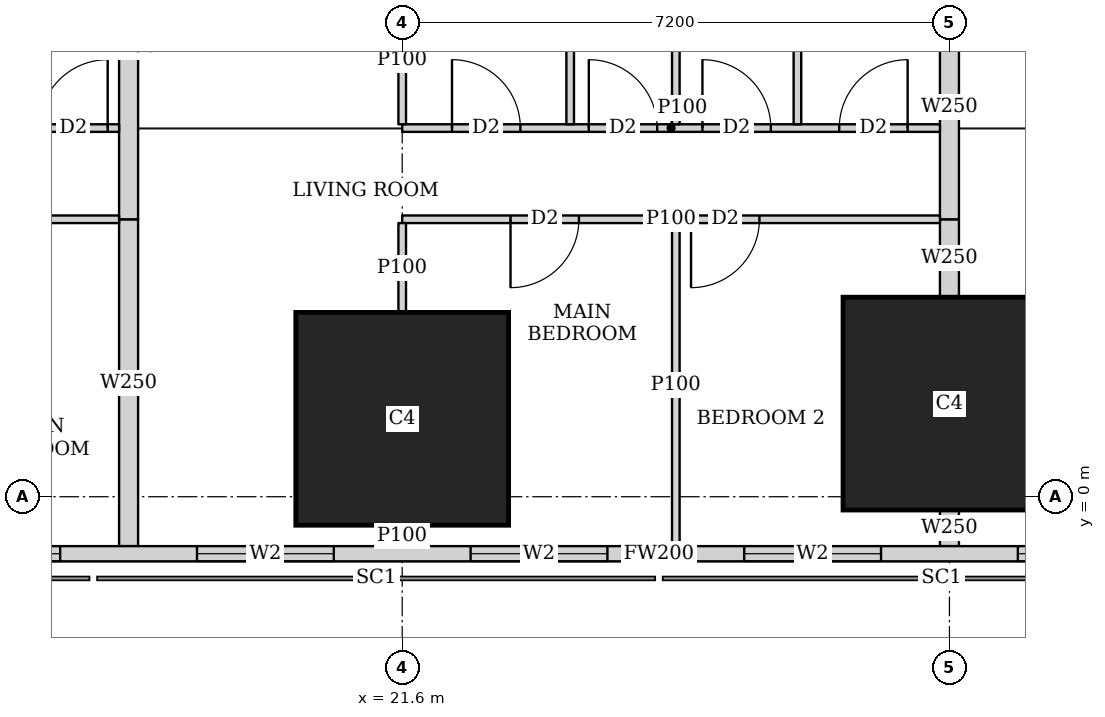
"""IFC4 building model, lengths in metres.
Left out: names, types, materials, properties, quantities, classifications, styles, units other than length and angle.
Written with IfcOpenShell. Run it as: python <this file> out.ifc"""

import sys

from ifc_helpers import new_model, si_unit, direction, frame, frame_2d, origin, origin_2d, place, context, subcontext, project, spatial, rectangle, extrude, element, fill, save


model = new_model("IFC4")
c1 = context("Model", 3, precision=1e-05, world=origin(), true_north=direction((0.0, 1.0)))
c2 = subcontext(c1, "Body", "Model", "MODEL_VIEW")
j1 = project(units=[si_unit("LENGTHUNIT", "METRE"), si_unit("PLANEANGLEUNIT", "RADIAN")], contexts=[c1])
p1 = place(None, origin())
s1 = spatial("IfcSite", under=j1, at=p1, CompositionType="ELEMENT")
p2 = place(p1, origin())
s2 = spatial("IfcBuilding", under=s1, at=p2, CompositionType="ELEMENT")
p3 = place(p2, frame((0.0, 0.0, 53.75)))
s3 = spatial("IfcBuildingStorey", under=s2, at=p3, CompositionType="ELEMENT", Elevation=53.75)
for number, where, z_axis, x_axis in (
    (1, (21.6, 1.025, 0.0), (0.0, 0.0, 1.0), (1.0, 0.0, 0.0)),
    (2, (28.8, 1.225, 0.0), (0.0, 0.0, 1.0), (1.0, 0.0, 0.0)),
):
    element("IfcColumn", number, at=place(p3, frame(where, z_axis=z_axis, x_axis=x_axis)), inside=s3, PredefinedType="COLUMN", context=c2, shape_type="SweptSolid", body=[
        extrude(rectangle(XDim=2.8, YDim=2.8, at=origin_2d()), origin(), (0.0, 0.0, 1.0), 3.75),
    ])
p4 = place(p3, frame((2.163, -0.75, 0.0), z_axis=(0.0, 0.0, 1.0), x_axis=(1.0, 0.0, 0.0)))
e3 = element("IfcWall", 3, at=p4, inside=s3, PredefinedType="SOLIDWALL", context=c2, shape_type="SweptSolid", body=[
    extrude(rectangle(XDim=45.628, YDim=0.2, at=frame_2d((22.814, 0.0))), origin(), (0.0, 0.0, 1.0), 3.5),
])
p5 = place(p4, frame((9.537, 0.0, 0.9)))
e4 = element("IfcOpeningElement", 4, at=p5, cuts=e3, PredefinedType="OPENING", context=c2, shape_type="SweptSolid", body=[
    extrude(rectangle(XDim=1.8, YDim=1.5, at=frame_2d((0.9, 0.75))), frame((0.0, 0.11, 0.0), z_axis=(0.0, -1.0, 0.0), x_axis=(1.0, 0.0, 0.0)), (0.0, 0.0, 1.0), 0.22),
])
p6 = place(p4, frame((13.137, 0.0, 0.9)))
e5 = element("IfcOpeningElement", 5, at=p6, cuts=e3, PredefinedType="OPENING", context=c2, shape_type="SweptSolid", body=[
    extrude(rectangle(XDim=1.8, YDim=1.5, at=frame_2d((0.9, 0.75))), frame((0.0, 0.11, 0.0), z_axis=(0.0, -1.0, 0.0), x_axis=(1.0, 0.0, 0.0)), (0.0, 0.0, 1.0), 0.22),
])
p7 = place(p4, frame((16.737, 0.0, 0.9)))
e6 = element("IfcOpeningElement", 6, at=p7, cuts=e3, PredefinedType="OPENING", context=c2, shape_type="SweptSolid", body=[
    extrude(rectangle(XDim=1.8, YDim=1.5, at=frame_2d((0.9, 0.75))), frame((0.0, 0.11, 0.0), z_axis=(0.0, -1.0, 0.0), x_axis=(1.0, 0.0, 0.0)), (0.0, 0.0, 1.0), 0.22),
])
p8 = place(p4, frame((20.337, 0.0, 0.9)))
e7 = element("IfcOpeningElement", 7, at=p8, cuts=e3, PredefinedType="OPENING", context=c2, shape_type="SweptSolid", body=[
    extrude(rectangle(XDim=1.8, YDim=1.5, at=frame_2d((0.9, 0.75))), frame((0.0, 0.11, 0.0), z_axis=(0.0, -1.0, 0.0), x_axis=(1.0, 0.0, 0.0)), (0.0, 0.0, 1.0), 0.22),
])
p9 = place(p4, frame((23.937, 0.0, 0.9)))
e8 = element("IfcOpeningElement", 8, at=p9, cuts=e3, PredefinedType="OPENING", context=c2, shape_type="SweptSolid", body=[
    extrude(rectangle(XDim=1.8, YDim=1.5, at=frame_2d((0.9, 0.75))), frame((0.0, 0.11, 0.0), z_axis=(0.0, -1.0, 0.0), x_axis=(1.0, 0.0, 0.0)), (0.0, 0.0, 1.0), 0.22),
])
p10 = place(p4, frame((27.537, 0.0, 0.9)))
e9 = element("IfcOpeningElement", 9, at=p10, cuts=e3, PredefinedType="OPENING", context=c2, shape_type="SweptSolid", body=[
    extrude(rectangle(XDim=1.8, YDim=1.5, at=frame_2d((0.9, 0.75))), frame((0.0, 0.11, 0.0), z_axis=(0.0, -1.0, 0.0), x_axis=(1.0, 0.0, 0.0)), (0.0, 0.0, 1.0), 0.22),
])
p11 = place(p4, frame((31.137, 0.0, 0.9)))
e10 = element("IfcOpeningElement", 10, at=p11, cuts=e3, PredefinedType="OPENING", context=c2, shape_type="SweptSolid", body=[
    extrude(rectangle(XDim=1.8, YDim=1.5, at=frame_2d((0.9, 0.75))), frame((0.0, 0.11, 0.0), z_axis=(0.0, -1.0, 0.0), x_axis=(1.0, 0.0, 0.0)), (0.0, 0.0, 1.0), 0.22),
])
p12 = place(p4, frame((34.737, 0.0, 0.9)))
e11 = element("IfcOpeningElement", 11, at=p12, cuts=e3, PredefinedType="OPENING", context=c2, shape_type="SweptSolid", body=[
    extrude(rectangle(XDim=1.8, YDim=1.5, at=frame_2d((0.9, 0.75))), frame((0.0, 0.11, 0.0), z_axis=(0.0, -1.0, 0.0), x_axis=(1.0, 0.0, 0.0)), (0.0, 0.0, 1.0), 0.22),
])
p13 = place(p3, frame((17.875, 3.65, 0.0), z_axis=(0.0, 0.0, 1.0), x_axis=(-1.0, 0.0, 0.0)))
e12 = element("IfcWall", 12, at=p13, inside=s3, PredefinedType="PARTITIONING", context=c2, shape_type="SweptSolid", body=[
    extrude(rectangle(XDim=3.475, YDim=0.1, at=frame_2d((1.738, 0.0))), origin(), (0.0, 0.0, 1.0), 3.5),
])
p14 = place(p13, frame((1.15, 0.0, 0.0)))
e13 = element("IfcOpeningElement", 13, at=p14, cuts=e12, PredefinedType="OPENING", context=c2, shape_type="SweptSolid", body=[
    extrude(rectangle(XDim=0.9, YDim=2.1, at=frame_2d((0.45, 1.05))), frame((0.0, 0.06, 0.0), z_axis=(0.0, -1.0, 0.0), x_axis=(1.0, 0.0, 0.0)), (0.0, 0.0, 1.0), 0.12),
])
p15 = place(p3, frame((17.875, 4.85, 0.0), z_axis=(0.0, 0.0, 1.0), x_axis=(-1.0, 0.0, 0.0)))
e14 = element("IfcWall", 14, at=p15, inside=s3, PredefinedType="PARTITIONING", context=c2, shape_type="SweptSolid", body=[
    extrude(rectangle(XDim=3.475, YDim=0.1, at=frame_2d((1.738, 0.0))), origin(), (0.0, 0.0, 1.0), 3.5),
])
p16 = place(p15, frame((1.92, 0.0, 0.0)))
e15 = element("IfcOpeningElement", 15, at=p16, cuts=e14, PredefinedType="OPENING", context=c2, shape_type="SweptSolid", body=[
    extrude(rectangle(XDim=0.9, YDim=2.1, at=frame_2d((0.45, 1.05))), frame((0.0, 0.06, 0.0), z_axis=(0.0, -1.0, 0.0), x_axis=(1.0, 0.0, 0.0)), (0.0, 0.0, 1.0), 0.12),
])
p17 = place(p15, frame((0.15, 0.0, 0.0)))
e16 = element("IfcOpeningElement", 16, at=p17, cuts=e14, PredefinedType="OPENING", context=c2, shape_type="SweptSolid", body=[
    extrude(rectangle(XDim=0.9, YDim=2.1, at=frame_2d((0.45, 1.05))), frame((0.0, 0.06, 0.0), z_axis=(0.0, -1.0, 0.0), x_axis=(1.0, 0.0, 0.0)), (0.0, 0.0, 1.0), 0.12),
])
p18 = place(p3, frame((28.675, 3.65, 0.0), z_axis=(0.0, 0.0, 1.0), x_axis=(-1.0, 0.0, 0.0)))
e17 = element("IfcWall", 17, at=p18, inside=s3, PredefinedType="PARTITIONING", context=c2, shape_type="SweptSolid", body=[
    extrude(rectangle(XDim=7.075, YDim=0.1, at=frame_2d((3.538, 0.0))), origin(), (0.0, 0.0, 1.0), 3.5),
])
p19 = place(p18, frame((4.75, 0.0, 0.0)))
e18 = element("IfcOpeningElement", 18, at=p19, cuts=e17, PredefinedType="OPENING", context=c2, shape_type="SweptSolid", body=[
    extrude(rectangle(XDim=0.9, YDim=2.1, at=frame_2d((0.45, 1.05))), frame((0.0, 0.06, 0.0), z_axis=(0.0, -1.0, 0.0), x_axis=(1.0, 0.0, 0.0)), (0.0, 0.0, 1.0), 0.12),
])
p20 = place(p18, frame((2.375, 0.0, 0.0)))
e19 = element("IfcOpeningElement", 19, at=p20, cuts=e17, PredefinedType="OPENING", context=c2, shape_type="SweptSolid", body=[
    extrude(rectangle(XDim=0.9, YDim=2.1, at=frame_2d((0.45, 1.05))), frame((0.0, 0.06, 0.0), z_axis=(0.0, -1.0, 0.0), x_axis=(1.0, 0.0, 0.0)), (0.0, 0.0, 1.0), 0.12),
])
p21 = place(p3, frame((28.675, 4.85, 0.0), z_axis=(0.0, 0.0, 1.0), x_axis=(-1.0, 0.0, 0.0)))
e20 = element("IfcWall", 20, at=p21, inside=s3, PredefinedType="PARTITIONING", context=c2, shape_type="SweptSolid", body=[
    extrude(rectangle(XDim=7.075, YDim=0.1, at=frame_2d((3.538, 0.0))), origin(), (0.0, 0.0, 1.0), 3.5),
])
p22 = place(p21, frame((5.52, 0.0, 0.0)))
e21 = element("IfcOpeningElement", 21, at=p22, cuts=e20, PredefinedType="OPENING", context=c2, shape_type="SweptSolid", body=[
    extrude(rectangle(XDim=0.9, YDim=2.1, at=frame_2d((0.45, 1.05))), frame((0.0, 0.06, 0.0), z_axis=(0.0, -1.0, 0.0), x_axis=(1.0, 0.0, 0.0)), (0.0, 0.0, 1.0), 0.12),
])
p23 = place(p21, frame((2.225, 0.0, 0.0)))
e22 = element("IfcOpeningElement", 22, at=p23, cuts=e20, PredefinedType="OPENING", context=c2, shape_type="SweptSolid", body=[
    extrude(rectangle(XDim=0.9, YDim=2.1, at=frame_2d((0.45, 1.05))), frame((0.0, 0.06, 0.0), z_axis=(0.0, -1.0, 0.0), x_axis=(1.0, 0.0, 0.0)), (0.0, 0.0, 1.0), 0.12),
])
p24 = place(p21, frame((3.72, 0.0, 0.0)))
e23 = element("IfcOpeningElement", 23, at=p24, cuts=e20, PredefinedType="OPENING", context=c2, shape_type="SweptSolid", body=[
    extrude(rectangle(XDim=0.9, YDim=2.1, at=frame_2d((0.45, 1.05))), frame((0.0, 0.06, 0.0), z_axis=(0.0, -1.0, 0.0), x_axis=(1.0, 0.0, 0.0)), (0.0, 0.0, 1.0), 0.12),
])
p25 = place(p21, frame((0.425, 0.0, 0.0)))
e24 = element("IfcOpeningElement", 24, at=p25, cuts=e20, PredefinedType="OPENING", context=c2, shape_type="SweptSolid", body=[
    extrude(rectangle(XDim=0.9, YDim=2.1, at=frame_2d((0.45, 1.05))), frame((0.0, 0.06, 0.0), z_axis=(0.0, -1.0, 0.0), x_axis=(1.0, 0.0, 0.0)), (0.0, 0.0, 1.0), 0.12),
])
p26 = place(p3, frame((21.6, -0.65, 0.0), z_axis=(0.0, 0.0, 1.0), x_axis=(0.0, 1.0, 0.0)))
e25 = element("IfcWall", 25, at=p26, inside=s3, PredefinedType="PARTITIONING", context=c2, shape_type="SweptSolid", body=[
    extrude(rectangle(XDim=0.274, YDim=0.1, at=frame_2d((0.137, 0.0))), origin(), (0.0, 0.0, 1.0), 3.5),
])
p27 = place(p3, frame((21.6, 2.426, 0.0), z_axis=(0.0, 0.0, 1.0), x_axis=(0.0, 1.0, 0.0)))
e26 = element("IfcWall", 26, at=p27, inside=s3, PredefinedType="PARTITIONING", context=c2, shape_type="SweptSolid", body=[
    extrude(rectangle(XDim=1.174, YDim=0.1, at=frame_2d((0.587, 0.0))), origin(), (0.0, 0.0, 1.0), 3.5),
])
p28 = place(p3, frame((25.2, -0.65, 0.0), z_axis=(0.0, 0.0, 1.0), x_axis=(0.0, 1.0, 0.0)))
e27 = element("IfcWall", 27, at=p28, inside=s3, PredefinedType="PARTITIONING", context=c2, shape_type="SweptSolid", body=[
    extrude(rectangle(XDim=4.25, YDim=0.1, at=frame_2d((2.125, 0.0))), origin(), (0.0, 0.0, 1.0), 2.05),
])
p29 = place(p3, frame((21.6, 4.9, 0.0), z_axis=(0.0, 0.0, 1.0), x_axis=(0.0, 1.0, 0.0)))
e28 = element("IfcWall", 28, at=p29, inside=s3, PredefinedType="PARTITIONING", context=c2, shape_type="SweptSolid", body=[
    extrude(rectangle(XDim=1.699, YDim=0.1, at=frame_2d((0.85, 0.0))), origin(), (0.0, 0.0, 1.0), 3.5),
])
for number, where, z_axis, x_axis in (
    (29, (25.2, 4.9, 0.0), (0.0, 0.0, 1.0), (0.0, 1.0, 0.0)),
    (30, (23.81, 4.9, 0.0), (0.0, 0.0, 1.0), (0.0, 1.0, 0.0)),
    (31, (26.8, 4.9, 0.0), (0.0, 0.0, 1.0), (0.0, 1.0, 0.0)),
):
    element("IfcWall", number, at=place(p3, frame(where, z_axis=z_axis, x_axis=x_axis)), inside=s3, PredefinedType="PARTITIONING", context=c2, shape_type="SweptSolid", body=[
        extrude(rectangle(XDim=3.275, YDim=0.1, at=frame_2d((1.638, 0.0))), origin(), (0.0, 0.0, 1.0), 3.5),
    ])
p30 = place(p3, frame((18.0, -0.65, 0.0), z_axis=(0.0, 0.0, 1.0), x_axis=(0.0, 1.0, 0.0)))
e32 = element("IfcWall", 32, at=p30, inside=s3, PredefinedType="SOLIDWALL", context=c2, shape_type="SweptSolid", body=[
    extrude(rectangle(XDim=4.3, YDim=0.25, at=frame_2d((2.15, 0.0))), origin(), (0.0, 0.0, 1.0), 2.05),
])
p31 = place(p3, frame((18.0, 3.65, 0.0), z_axis=(0.0, 0.0, 1.0), x_axis=(0.0, 1.0, 0.0)))
e33 = element("IfcWall", 33, at=p31, inside=s3, PredefinedType="SOLIDWALL", context=c2, shape_type="SweptSolid", body=[
    extrude(rectangle(XDim=4.525, YDim=0.25, at=frame_2d((2.263, 0.0))), origin(), (0.0, 0.0, 1.0), 3.5),
])
p32 = place(p3, frame((28.8, -0.65, 0.0), z_axis=(0.0, 0.0, 1.0), x_axis=(0.0, 1.0, 0.0)))
e34 = element("IfcWall", 34, at=p32, inside=s3, PredefinedType="SOLIDWALL", context=c2, shape_type="SweptSolid", body=[
    extrude(rectangle(XDim=0.474, YDim=0.25, at=frame_2d((0.237, 0.0))), origin(), (0.0, 0.0, 1.0), 3.5),
])
p33 = place(p3, frame((28.8, 2.626, 0.0), z_axis=(0.0, 0.0, 1.0), x_axis=(0.0, 1.0, 0.0)))
e35 = element("IfcWall", 35, at=p33, inside=s3, PredefinedType="SOLIDWALL", context=c2, shape_type="SweptSolid", body=[
    extrude(rectangle(XDim=1.024, YDim=0.25, at=frame_2d((0.512, 0.0))), origin(), (0.0, 0.0, 1.0), 3.5),
])
p34 = place(p3, frame((28.8, 3.65, 0.0), z_axis=(0.0, 0.0, 1.0), x_axis=(0.0, 1.0, 0.0)))
e36 = element("IfcWall", 36, at=p34, inside=s3, PredefinedType="SOLIDWALL", context=c2, shape_type="SweptSolid", body=[
    extrude(rectangle(XDim=2.949, YDim=0.25, at=frame_2d((1.475, 0.0))), origin(), (0.0, 0.0, 1.0), 3.5),
])
p35 = place(p6, origin())
e37 = element("IfcWindow", 37, at=p35, inside=s3, PartitioningType="SINGLE_PANEL", PredefinedType="WINDOW", context=c2, shape_type="SweptSolid", body=[
    extrude(rectangle(XDim=1.8, YDim=1.5, at=frame_2d((0.9, 0.75))), frame((0.0, 0.03, 0.0), z_axis=(0.0, -1.0, 0.0), x_axis=(1.0, 0.0, 0.0)), (0.0, 0.0, 1.0), 0.06),
])
fill(e5, e37)
p36 = place(p7, origin())
e38 = element("IfcWindow", 38, at=p36, inside=s3, PartitioningType="SINGLE_PANEL", PredefinedType="WINDOW", context=c2, shape_type="SweptSolid", body=[
    extrude(rectangle(XDim=1.8, YDim=1.5, at=frame_2d((0.9, 0.75))), frame((0.0, 0.03, 0.0), z_axis=(0.0, -1.0, 0.0), x_axis=(1.0, 0.0, 0.0)), (0.0, 0.0, 1.0), 0.06),
])
fill(e6, e38)
p37 = place(p8, origin())
e39 = element("IfcWindow", 39, at=p37, inside=s3, PartitioningType="SINGLE_PANEL", PredefinedType="WINDOW", context=c2, shape_type="SweptSolid", body=[
    extrude(rectangle(XDim=1.8, YDim=1.5, at=frame_2d((0.9, 0.75))), frame((0.0, 0.03, 0.0), z_axis=(0.0, -1.0, 0.0), x_axis=(1.0, 0.0, 0.0)), (0.0, 0.0, 1.0), 0.06),
])
fill(e7, e39)
p38 = place(p9, origin())
e40 = element("IfcWindow", 40, at=p38, inside=s3, PartitioningType="SINGLE_PANEL", PredefinedType="WINDOW", context=c2, shape_type="SweptSolid", body=[
    extrude(rectangle(XDim=1.8, YDim=1.5, at=frame_2d((0.9, 0.75))), frame((0.0, 0.03, 0.0), z_axis=(0.0, -1.0, 0.0), x_axis=(1.0, 0.0, 0.0)), (0.0, 0.0, 1.0), 0.06),
])
fill(e8, e40)
p39 = place(p10, origin())
e41 = element("IfcWindow", 41, at=p39, inside=s3, PartitioningType="SINGLE_PANEL", PredefinedType="WINDOW", context=c2, shape_type="SweptSolid", body=[
    extrude(rectangle(XDim=1.8, YDim=1.5, at=frame_2d((0.9, 0.75))), frame((0.0, 0.03, 0.0), z_axis=(0.0, -1.0, 0.0), x_axis=(1.0, 0.0, 0.0)), (0.0, 0.0, 1.0), 0.06),
])
fill(e9, e41)
p40 = place(p17, origin())
e42 = element("IfcDoor", 42, at=p40, inside=s3, OperationType="SINGLE_SWING_RIGHT", PredefinedType="DOOR", context=c2, shape_type="SweptSolid", body=[
    extrude(rectangle(XDim=0.9, YDim=2.1, at=frame_2d((0.45, 1.05))), frame((0.0, 0.025, 0.0), z_axis=(0.0, -1.0, 0.0), x_axis=(1.0, 0.0, 0.0)), (0.0, 0.0, 1.0), 0.05),
])
fill(e16, e42)
p41 = place(p19, origin())
e43 = element("IfcDoor", 43, at=p41, inside=s3, OperationType="SINGLE_SWING_RIGHT", PredefinedType="DOOR", context=c2, shape_type="SweptSolid", body=[
    extrude(rectangle(XDim=0.9, YDim=2.1, at=frame_2d((0.45, 1.05))), frame((0.0, 0.025, 0.0), z_axis=(0.0, -1.0, 0.0), x_axis=(1.0, 0.0, 0.0)), (0.0, 0.0, 1.0), 0.05),
])
fill(e18, e43)
p42 = place(p20, origin())
e44 = element("IfcDoor", 44, at=p42, inside=s3, OperationType="SINGLE_SWING_RIGHT", PredefinedType="DOOR", context=c2, shape_type="SweptSolid", body=[
    extrude(rectangle(XDim=0.9, YDim=2.1, at=frame_2d((0.45, 1.05))), frame((0.0, 0.025, 0.0), z_axis=(0.0, -1.0, 0.0), x_axis=(1.0, 0.0, 0.0)), (0.0, 0.0, 1.0), 0.05),
])
fill(e19, e44)
p43 = place(p22, origin())
e45 = element("IfcDoor", 45, at=p43, inside=s3, OperationType="SINGLE_SWING_LEFT", PredefinedType="DOOR", context=c2, shape_type="SweptSolid", body=[
    extrude(rectangle(XDim=0.9, YDim=2.1, at=frame_2d((0.45, 1.05))), frame((0.0, 0.025, 0.0), z_axis=(0.0, -1.0, 0.0), x_axis=(1.0, 0.0, 0.0)), (0.0, 0.0, 1.0), 0.05),
])
fill(e21, e45)
p44 = place(p23, origin())
e46 = element("IfcDoor", 46, at=p44, inside=s3, OperationType="SINGLE_SWING_LEFT", PredefinedType="DOOR", context=c2, shape_type="SweptSolid", body=[
    extrude(rectangle(XDim=0.9, YDim=2.1, at=frame_2d((0.45, 1.05))), frame((0.0, 0.025, 0.0), z_axis=(0.0, -1.0, 0.0), x_axis=(1.0, 0.0, 0.0)), (0.0, 0.0, 1.0), 0.05),
])
fill(e22, e46)
p45 = place(p24, origin())
e47 = element("IfcDoor", 47, at=p45, inside=s3, OperationType="SINGLE_SWING_LEFT", PredefinedType="DOOR", context=c2, shape_type="SweptSolid", body=[
    extrude(rectangle(XDim=0.9, YDim=2.1, at=frame_2d((0.45, 1.05))), frame((0.0, 0.025, 0.0), z_axis=(0.0, -1.0, 0.0), x_axis=(1.0, 0.0, 0.0)), (0.0, 0.0, 1.0), 0.05),
])
fill(e23, e47)
p46 = place(p25, origin())
e48 = element("IfcDoor", 48, at=p46, inside=s3, OperationType="SINGLE_SWING_RIGHT", PredefinedType="DOOR", context=c2, shape_type="SweptSolid", body=[
    extrude(rectangle(XDim=0.9, YDim=2.1, at=frame_2d((0.45, 1.05))), frame((0.0, 0.025, 0.0), z_axis=(0.0, -1.0, 0.0), x_axis=(1.0, 0.0, 0.0)), (0.0, 0.0, 1.0), 0.05),
])
fill(e24, e48)
save(model, sys.argv[1])
